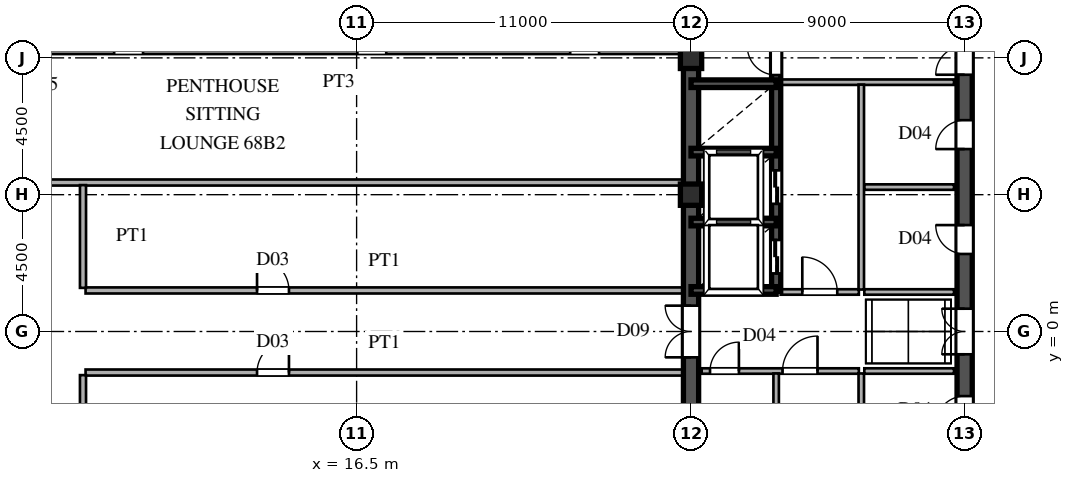
"""IFC4 building model, lengths in metres.
Left out: names, types, materials, properties, quantities, classifications, styles, units other than length and angle.
Written with IfcOpenShell. Run it as: python <this file> out.ifc"""

import sys

from ifc_helpers import new_model, si_unit, direction, frame, frame_2d, origin, origin_2d, place, context, subcontext, project, spatial, rectangle, hollow_rectangle, extrude, source, transform, mapped, element, fill, save


model = new_model("IFC4")
c1 = context("Model", 3, precision=1e-05, world=origin(), true_north=direction((0.0, 1.0)))
c2 = subcontext(c1, "Body", "Model", "MODEL_VIEW")
j1 = project(units=[si_unit("LENGTHUNIT", "METRE"), si_unit("PLANEANGLEUNIT", "RADIAN")], contexts=[c1])
p1 = place(None, origin())
s1 = spatial("IfcSite", under=j1, at=p1, CompositionType="ELEMENT")
p2 = place(p1, origin())
s2 = spatial("IfcBuilding", under=s1, at=p2, CompositionType="ELEMENT")
p3 = place(p2, frame((0.0, 0.0, 258.15)))
s3 = spatial("IfcBuildingStorey", under=s2, at=p3, CompositionType="ELEMENT", Elevation=258.15)
m1 = source(origin(), c2, "Body", "SweptSolid", [
    extrude(hollow_rectangle(XDim=0.7, YDim=0.7, WallThickness=0.03, at=origin_2d()), origin(), (0.0, 0.0, 1.0), 3.75),
])
for number, where, z_axis, x_axis in (
    (1, (27.5, 4.5, 0.0), (0.0, 0.0, 1.0), (1.0, 0.0, 0.0)),
    (2, (27.5, 9.0, 0.0), (0.0, 0.0, 1.0), (1.0, 0.0, 0.0)),
):
    element("IfcColumn", number, at=place(p3, frame(where, z_axis=z_axis, x_axis=x_axis)), inside=s3, PredefinedType="COLUMN", context=c2, shape_type="MappedRepresentation", body=[
        mapped(m1, transform((0.0, 0.0, 0.0), scale=1.0)),
    ])
for number, where, z_axis, x_axis in (
    (3, (27.5, -13.5, 0.0), (0.0, 0.0, 1.0), (0.0, 1.0, 0.0)),
    (4, (27.5, 1.3, 0.0), (0.0, 0.0, 1.0), (0.0, 1.0, 0.0)),
):
    element("IfcWall", number, at=place(p3, frame(where, z_axis=z_axis, x_axis=x_axis)), inside=s3, PredefinedType="SHEAR", context=c2, shape_type="SweptSolid", body=[
        extrude(rectangle(XDim=12.2, YDim=0.5, at=frame_2d((6.1, 0.0))), origin(), (0.0, 0.0, 1.0), 3.53),
    ])
p4 = place(p3, frame((27.5, -1.3, 0.0), z_axis=(0.0, 0.0, 1.0), x_axis=(0.0, 1.0, 0.0)))
e5 = element("IfcWall", 5, at=p4, inside=s3, PredefinedType="SHEAR", context=c2, shape_type="SweptSolid", body=[
    extrude(rectangle(XDim=2.6, YDim=0.5, at=frame_2d((1.3, 0.0))), origin(), (0.0, 0.0, 1.0), 3.53),
])
p5 = place(p4, frame((0.45, 0.0, 0.0)))
e6 = element("IfcOpeningElement", 6, at=p5, cuts=e5, PredefinedType="OPENING", context=c2, shape_type="SweptSolid", body=[
    extrude(rectangle(XDim=1.7, YDim=2.35, at=frame_2d((0.85, 1.175))), frame((0.0, 0.26, 0.0), z_axis=(0.0, -1.0, 0.0), x_axis=(1.0, 0.0, 0.0)), (0.0, 0.0, 1.0), 0.52),
])
p6 = place(p3, frame((36.5, -1.3, 0.0), z_axis=(0.0, 0.0, 1.0), x_axis=(0.0, 1.0, 0.0)))
e7 = element("IfcWall", 7, at=p6, inside=s3, PredefinedType="SHEAR", context=c2, shape_type="SweptSolid", body=[
    extrude(rectangle(XDim=2.6, YDim=0.5, at=frame_2d((1.3, 0.0))), origin(), (0.0, 0.0, 1.0), 3.53),
])
p7 = place(p6, frame((0.55, 0.0, 0.0)))
e8 = element("IfcOpeningElement", 8, at=p7, cuts=e7, PredefinedType="OPENING", context=c2, shape_type="SweptSolid", body=[
    extrude(rectangle(XDim=1.5, YDim=2.3, at=frame_2d((0.75, 1.15))), frame((0.0, 0.26, 0.0), z_axis=(0.0, -1.0, 0.0), x_axis=(1.0, 0.0, 0.0)), (0.0, 0.0, 1.0), 0.52),
])
p8 = place(p3, frame((36.5, 8.2, 0.0), z_axis=(0.0, 0.0, 1.0), x_axis=(0.0, 1.0, 0.0)))
e9 = element("IfcWall", 9, at=p8, inside=s3, PredefinedType="SHEAR", context=c2, shape_type="SweptSolid", body=[
    extrude(rectangle(XDim=5.45, YDim=0.5, at=frame_2d((2.725, 0.0))), origin(), (0.0, 0.0, 1.0), 3.53),
])
p9 = place(p8, frame((0.245, 0.0, 0.0)))
e10 = element("IfcOpeningElement", 10, at=p9, cuts=e9, PredefinedType="OPENING", context=c2, shape_type="SweptSolid", body=[
    extrude(rectangle(XDim=0.95, YDim=2.15, at=frame_2d((0.475, 1.075))), frame((0.0, 0.26, 0.0), z_axis=(0.0, -1.0, 0.0), x_axis=(1.0, 0.0, 0.0)), (0.0, 0.0, 1.0), 0.52),
])
p10 = place(p3, frame((36.5, -3.9, 0.0), z_axis=(0.0, 0.0, 1.0), x_axis=(0.0, 1.0, 0.0)))
e11 = element("IfcWall", 11, at=p10, inside=s3, PredefinedType="SHEAR", context=c2, shape_type="SweptSolid", body=[
    extrude(rectangle(XDim=2.6, YDim=0.5, at=frame_2d((1.3, 0.0))), origin(), (0.0, 0.0, 1.0), 3.53),
])
p11 = place(p10, frame((0.825, 0.0, 0.0)))
e12 = element("IfcOpeningElement", 12, at=p11, cuts=e11, PredefinedType="OPENING", context=c2, shape_type="SweptSolid", body=[
    extrude(rectangle(XDim=0.95, YDim=2.15, at=frame_2d((0.475, 1.075))), frame((0.0, 0.26, 0.0), z_axis=(0.0, -1.0, 0.0), x_axis=(1.0, 0.0, 0.0)), (0.0, 0.0, 1.0), 0.52),
])
p12 = place(p3, frame((36.5, 1.3, 0.0), z_axis=(0.0, 0.0, 1.0), x_axis=(0.0, 1.0, 0.0)))
e13 = element("IfcWall", 13, at=p12, inside=s3, PredefinedType="SHEAR", context=c2, shape_type="SweptSolid", body=[
    extrude(rectangle(XDim=3.45, YDim=0.5, at=frame_2d((1.725, 0.0))), origin(), (0.0, 0.0, 1.0), 3.53),
])
p13 = place(p12, frame((1.25, 0.0, 0.0)))
e14 = element("IfcOpeningElement", 14, at=p13, cuts=e13, PredefinedType="OPENING", context=c2, shape_type="SweptSolid", body=[
    extrude(rectangle(XDim=0.95, YDim=2.15, at=frame_2d((0.475, 1.075))), frame((0.0, 0.26, 0.0), z_axis=(0.0, -1.0, 0.0), x_axis=(1.0, 0.0, 0.0)), (0.0, 0.0, 1.0), 0.52),
])
p14 = place(p3, frame((36.5, 4.75, 0.0), z_axis=(0.0, 0.0, 1.0), x_axis=(0.0, 1.0, 0.0)))
e15 = element("IfcWall", 15, at=p14, inside=s3, PredefinedType="SHEAR", context=c2, shape_type="SweptSolid", body=[
    extrude(rectangle(XDim=3.45, YDim=0.5, at=frame_2d((1.725, 0.0))), origin(), (0.0, 0.0, 1.0), 3.53),
])
p15 = place(p14, frame((1.25, 0.0, 0.0)))
e16 = element("IfcOpeningElement", 16, at=p15, cuts=e15, PredefinedType="OPENING", context=c2, shape_type="SweptSolid", body=[
    extrude(rectangle(XDim=0.95, YDim=2.15, at=frame_2d((0.475, 1.075))), frame((0.0, 0.26, 0.0), z_axis=(0.0, -1.0, 0.0), x_axis=(1.0, 0.0, 0.0)), (0.0, 0.0, 1.0), 0.52),
])
for number, where, z_axis, x_axis in (
    (17, (27.5, 1.35, 0.0), (0.0, 0.0, 1.0), (1.0, 0.0, 0.0)),
    (18, (27.5, 3.6, 0.0), (0.0, 0.0, 1.0), (1.0, 0.0, 0.0)),
    (19, (27.5, 5.9, 0.0), (0.0, 0.0, 1.0), (1.0, 0.0, 0.0)),
    (20, (27.5, 8.15, 0.0), (0.0, 0.0, 1.0), (1.0, 0.0, 0.0)),
):
    element("IfcWall", number, at=place(p3, frame(where, z_axis=z_axis, x_axis=x_axis)), inside=s3, PredefinedType="SHEAR", context=c2, shape_type="SweptSolid", body=[
        extrude(rectangle(XDim=2.8, YDim=0.25, at=frame_2d((1.4, 0.0))), origin(), (0.0, 0.0, 1.0), 3.53),
    ])
p16 = place(p3, frame((30.3, 1.32, 0.0), z_axis=(0.0, 0.0, 1.0), x_axis=(0.0, 1.0, 0.0)))
e21 = element("IfcWall", 21, at=p16, inside=s3, PredefinedType="SHEAR", context=c2, shape_type="SweptSolid", body=[
    extrude(rectangle(XDim=2.28, YDim=0.3, at=frame_2d((1.14, 0.0))), origin(), (0.0, 0.0, 1.0), 3.53),
])
p17 = place(p16, frame((0.59, 0.0, 0.0)))
e22 = element("IfcOpeningElement", 22, at=p17, cuts=e21, PredefinedType="OPENING", context=c2, shape_type="SweptSolid", body=[
    extrude(rectangle(XDim=1.1, YDim=2.2, at=frame_2d((0.55, 1.1))), frame((0.0, 0.16, 0.0), z_axis=(0.0, -1.0, 0.0), x_axis=(1.0, 0.0, 0.0)), (0.0, 0.0, 1.0), 0.32),
])
p18 = place(p3, frame((30.3, 3.6, 0.0), z_axis=(0.0, 0.0, 1.0), x_axis=(0.0, 1.0, 0.0)))
e23 = element("IfcWall", 23, at=p18, inside=s3, PredefinedType="SHEAR", context=c2, shape_type="SweptSolid", body=[
    extrude(rectangle(XDim=2.3, YDim=0.3, at=frame_2d((1.15, 0.0))), origin(), (0.0, 0.0, 1.0), 3.53),
])
p19 = place(p18, frame((0.6, 0.0, 0.0)))
e24 = element("IfcOpeningElement", 24, at=p19, cuts=e23, PredefinedType="OPENING", context=c2, shape_type="SweptSolid", body=[
    extrude(rectangle(XDim=1.1, YDim=2.2, at=frame_2d((0.55, 1.1))), frame((0.0, 0.16, 0.0), z_axis=(0.0, -1.0, 0.0), x_axis=(1.0, 0.0, 0.0)), (0.0, 0.0, 1.0), 0.32),
])
p20 = place(p3, frame((30.3, 5.9, 0.0), z_axis=(0.0, 0.0, 1.0), x_axis=(0.0, 1.0, 0.0)))
e25 = element("IfcWall", 25, at=p20, inside=s3, PredefinedType="SHEAR", context=c2, shape_type="SweptSolid", body=[
    extrude(rectangle(XDim=2.25, YDim=0.3, at=frame_2d((1.125, 0.0))), origin(), (0.0, 0.0, 1.0), 3.53),
])
p21 = place(p3, frame((30.3, 8.15, 0.0), z_axis=(0.0, 0.0, 1.0), x_axis=(0.0, 1.0, 0.0)))
e26 = element("IfcWall", 26, at=p21, inside=s3, PredefinedType="SHEAR", context=c2, shape_type="SweptSolid", body=[
    extrude(rectangle(XDim=1.53, YDim=0.3, at=frame_2d((0.765, 0.0))), origin(), (0.0, 0.0, 1.0), 3.53),
])
p22 = place(p21, frame((0.285, 0.0, 0.0)))
e27 = element("IfcOpeningElement", 27, at=p22, cuts=e26, PredefinedType="OPENING", context=c2, shape_type="SweptSolid", body=[
    extrude(rectangle(XDim=0.95, YDim=2.15, at=frame_2d((0.475, 1.075))), frame((0.0, 0.16, 0.0), z_axis=(0.0, -1.0, 0.0), x_axis=(1.0, 0.0, 0.0)), (0.0, 0.0, 1.0), 0.32),
])
p23 = place(p3, frame((30.45, 8.2, 0.0), z_axis=(0.0, 0.0, 1.0), x_axis=(1.0, 0.0, 0.0)))
e28 = element("IfcWall", 28, at=p23, inside=s3, PredefinedType="PARTITIONING", context=c2, shape_type="SweptSolid", body=[
    extrude(rectangle(XDim=5.7, YDim=0.18, at=frame_2d((2.85, 0.0))), origin(), (0.0, 0.0, 1.0), 3.53),
])
p24 = place(p3, frame((33.1, -6.42, 0.0), z_axis=(0.0, 0.0, 1.0), x_axis=(0.0, 1.0, 0.0)))
e29 = element("IfcWall", 29, at=p24, inside=s3, PredefinedType="PARTITIONING", context=c2, shape_type="SweptSolid", body=[
    extrude(rectangle(XDim=5.04, YDim=0.18, at=frame_2d((2.52, 0.0))), origin(), (0.0, 0.0, 1.0), 3.53),
])
p25 = place(p3, frame((33.1, 1.38, 0.0), z_axis=(0.0, 0.0, 1.0), x_axis=(0.0, 1.0, 0.0)))
e30 = element("IfcWall", 30, at=p25, inside=s3, PredefinedType="PARTITIONING", context=c2, shape_type="SweptSolid", body=[
    extrude(rectangle(XDim=6.74, YDim=0.18, at=frame_2d((3.37, 0.0))), origin(), (0.0, 0.0, 1.0), 3.53),
])
p26 = place(p3, frame((27.85, -1.3, 0.0), z_axis=(0.0, 0.0, 1.0), x_axis=(1.0, 0.0, 0.0)))
e31 = element("IfcWall", 31, at=p26, inside=s3, PredefinedType="PARTITIONING", context=c2, shape_type="SweptSolid", body=[
    extrude(rectangle(XDim=2.45, YDim=0.18, at=frame_2d((1.225, 0.0))), origin(), (0.0, 0.0, 1.0), 3.53),
])
p27 = place(p26, frame((0.275, 0.0, 0.0)))
e32 = element("IfcOpeningElement", 32, at=p27, cuts=e31, PredefinedType="OPENING", context=c2, shape_type="SweptSolid", body=[
    extrude(rectangle(XDim=0.95, YDim=2.15, at=frame_2d((0.475, 1.075))), frame((0.0, 0.1, 0.0), z_axis=(0.0, -1.0, 0.0), x_axis=(1.0, 0.0, 0.0)), (0.0, 0.0, 1.0), 0.2),
])
p28 = place(p3, frame((30.3, -1.3, 0.0), z_axis=(0.0, 0.0, 1.0), x_axis=(1.0, 0.0, 0.0)))
e33 = element("IfcWall", 33, at=p28, inside=s3, PredefinedType="PARTITIONING", context=c2, shape_type="SweptSolid", body=[
    extrude(rectangle(XDim=2.72, YDim=0.18, at=frame_2d((1.36, 0.0))), origin(), (0.0, 0.0, 1.0), 3.53),
])
p29 = place(p28, frame((0.21, 0.0, 0.0)))
e34 = element("IfcOpeningElement", 34, at=p29, cuts=e33, PredefinedType="OPENING", context=c2, shape_type="SweptSolid", body=[
    extrude(rectangle(XDim=1.15, YDim=2.2, at=frame_2d((0.575, 1.1))), frame((0.0, 0.1, 0.0), z_axis=(0.0, -1.0, 0.0), x_axis=(1.0, 0.0, 0.0)), (0.0, 0.0, 1.0), 0.2),
])
p30 = place(p3, frame((30.3, -7.12, 0.0), z_axis=(0.0, 0.0, 1.0), x_axis=(0.0, 1.0, 0.0)))
e35 = element("IfcWall", 35, at=p30, inside=s3, PredefinedType="PARTITIONING", context=c2, shape_type="SweptSolid", body=[
    extrude(rectangle(XDim=5.74, YDim=0.18, at=frame_2d((2.87, 0.0))), origin(), (0.0, 0.0, 1.0), 3.53),
])
p31 = place(p3, frame((30.45, 1.3, 0.0), z_axis=(0.0, 0.0, 1.0), x_axis=(1.0, 0.0, 0.0)))
e36 = element("IfcWall", 36, at=p31, inside=s3, PredefinedType="PARTITIONING", context=c2, shape_type="SweptSolid", body=[
    extrude(rectangle(XDim=2.57, YDim=0.18, at=frame_2d((1.285, 0.0))), origin(), (0.0, 0.0, 1.0), 3.53),
])
p32 = place(p31, frame((0.71, 0.0, 0.0)))
e37 = element("IfcOpeningElement", 37, at=p32, cuts=e36, PredefinedType="OPENING", context=c2, shape_type="SweptSolid", body=[
    extrude(rectangle(XDim=1.15, YDim=2.2, at=frame_2d((0.575, 1.1))), frame((0.0, 0.1, 0.0), z_axis=(0.0, -1.0, 0.0), x_axis=(1.0, 0.0, 0.0)), (0.0, 0.0, 1.0), 0.2),
])
for number, where, z_axis, x_axis in (
    (38, (33.2, -1.3, 0.0), (0.0, 0.0, 1.0), (1.0, 0.0, 0.0)),
    (39, (33.2, 1.3, 0.0), (0.0, 0.0, 1.0), (1.0, 0.0, 0.0)),
    (40, (33.2, 4.75, 0.0), (0.0, 0.0, 1.0), (1.0, 0.0, 0.0)),
):
    element("IfcWall", number, at=place(p3, frame(where, z_axis=z_axis, x_axis=x_axis)), inside=s3, PredefinedType="PARTITIONING", context=c2, shape_type="SweptSolid", body=[
        extrude(rectangle(XDim=2.95, YDim=0.18, at=frame_2d((1.475, 0.0))), origin(), (0.0, 0.0, 1.0), 3.53),
    ])
p33 = place(p3, frame((7.585, -1.35, 0.0), z_axis=(0.0, 0.0, 1.0), x_axis=(1.0, 0.0, 0.0)))
e41 = element("IfcWall", 41, at=p33, inside=s3, PredefinedType="PARTITIONING", context=c2, shape_type="SweptSolid", body=[
    extrude(rectangle(XDim=19.66, YDim=0.2, at=frame_2d((9.83, 0.0))), origin(), (0.0, 0.0, 1.0), 3.53),
])
p34 = place(p33, frame((5.64, 0.0, 0.0)))
e42 = element("IfcOpeningElement", 42, at=p34, cuts=e41, PredefinedType="OPENING", context=c2, shape_type="SweptSolid", body=[
    extrude(rectangle(XDim=1.05, YDim=2.25, at=frame_2d((0.525, 1.125))), frame((0.0, 0.11, 0.0), z_axis=(0.0, -1.0, 0.0), x_axis=(1.0, 0.0, 0.0)), (0.0, 0.0, 1.0), 0.22),
])
p35 = place(p3, frame((7.585, 1.35, 0.0), z_axis=(0.0, 0.0, 1.0), x_axis=(1.0, 0.0, 0.0)))
e43 = element("IfcWall", 43, at=p35, inside=s3, PredefinedType="PARTITIONING", context=c2, shape_type="SweptSolid", body=[
    extrude(rectangle(XDim=19.66, YDim=0.2, at=frame_2d((9.83, 0.0))), origin(), (0.0, 0.0, 1.0), 3.53),
])
p36 = place(p35, frame((5.64, 0.0, 0.0)))
e44 = element("IfcOpeningElement", 44, at=p36, cuts=e43, PredefinedType="OPENING", context=c2, shape_type="SweptSolid", body=[
    extrude(rectangle(XDim=1.05, YDim=2.25, at=frame_2d((0.525, 1.125))), frame((0.0, 0.11, 0.0), z_axis=(0.0, -1.0, 0.0), x_axis=(1.0, 0.0, 0.0)), (0.0, 0.0, 1.0), 0.22),
])
p37 = place(p3, frame((-27.245, 4.9, 0.0), z_axis=(0.0, 0.0, 1.0), x_axis=(1.0, 0.0, 0.0)))
e45 = element("IfcWall", 45, at=p37, inside=s3, PredefinedType="PARTITIONING", context=c2, shape_type="SweptSolid", body=[
    extrude(rectangle(XDim=54.49, YDim=0.2, at=frame_2d((27.245, 0.0))), origin(), (0.0, 0.0, 1.0), 3.53),
])
p38 = place(p37, frame((22.47, 0.0, 0.0)))
e46 = element("IfcOpeningElement", 46, at=p38, cuts=e45, PredefinedType="OPENING", context=c2, shape_type="SweptSolid", body=[
    extrude(rectangle(XDim=1.05, YDim=2.25, at=frame_2d((0.525, 1.125))), frame((0.0, 0.11, 0.0), z_axis=(0.0, -1.0, 0.0), x_axis=(1.0, 0.0, 0.0)), (0.0, 0.0, 1.0), 0.22),
])
p39 = place(p3, frame((4.585, 9.2, 0.0), z_axis=(0.0, 0.0, 1.0), x_axis=(1.0, 0.0, 0.0)))
e47 = element("IfcWall", 47, at=p39, inside=s3, PredefinedType="PARTITIONING", context=c2, shape_type="SweptSolid", body=[
    extrude(rectangle(XDim=22.66, YDim=0.15, at=frame_2d((11.33, 0.0))), origin(), (0.0, 0.0, 1.0), 3.53),
])
p40 = place(p39, frame((3.94, 0.0, 0.0)))
e48 = element("IfcOpeningElement", 48, at=p40, cuts=e47, PredefinedType="OPENING", context=c2, shape_type="SweptSolid", body=[
    extrude(rectangle(XDim=0.95, YDim=2.15, at=frame_2d((0.475, 1.075))), frame((0.0, 0.085, 0.0), z_axis=(0.0, -1.0, 0.0), x_axis=(1.0, 0.0, 0.0)), (0.0, 0.0, 1.0), 0.17),
])
p41 = place(p39, frame((11.94, 0.0, 0.0)))
e49 = element("IfcOpeningElement", 49, at=p41, cuts=e47, PredefinedType="OPENING", context=c2, shape_type="SweptSolid", body=[
    extrude(rectangle(XDim=0.95, YDim=2.15, at=frame_2d((0.475, 1.075))), frame((0.0, 0.085, 0.0), z_axis=(0.0, -1.0, 0.0), x_axis=(1.0, 0.0, 0.0)), (0.0, 0.0, 1.0), 0.17),
])
p42 = place(p39, frame((18.94, 0.0, 0.0)))
e50 = element("IfcOpeningElement", 50, at=p42, cuts=e47, PredefinedType="OPENING", context=c2, shape_type="SweptSolid", body=[
    extrude(rectangle(XDim=0.95, YDim=2.15, at=frame_2d((0.475, 1.075))), frame((0.0, 0.085, 0.0), z_axis=(0.0, -1.0, 0.0), x_axis=(1.0, 0.0, 0.0)), (0.0, 0.0, 1.0), 0.17),
])
for number, where, z_axis, x_axis in (
    (51, (7.5, -4.815, 0.0), (0.0, 0.0, 1.0), (0.0, 1.0, 0.0)),
    (52, (7.5, 1.435, 0.0), (0.0, 0.0, 1.0), (0.0, 1.0, 0.0)),
):
    element("IfcWall", number, at=place(p3, frame(where, z_axis=z_axis, x_axis=x_axis)), inside=s3, PredefinedType="PARTITIONING", context=c2, shape_type="SweptSolid", body=[
        extrude(rectangle(XDim=3.38, YDim=0.2, at=frame_2d((1.69, 0.0))), origin(), (0.0, 0.0, 1.0), 3.53),
    ])
m2 = source(origin(), c2, "Body", "SweptSolid", [
    extrude(rectangle(XDim=1.7, YDim=2.35, at=frame_2d((0.85, 1.175))), frame((0.0, 0.025, 0.0), z_axis=(0.0, -1.0, 0.0), x_axis=(1.0, 0.0, 0.0)), (0.0, 0.0, 1.0), 0.05),
])
p43 = place(p5, origin())
e53 = element("IfcDoor", 53, at=p43, inside=s3, OperationType="DOUBLE_SWING_LEFT", PredefinedType="DOOR", context=c2, shape_type="MappedRepresentation", body=[
    mapped(m2, transform((0.0, 0.0, 0.0), scale=1.0)),
])
fill(e6, e53)
m3 = source(origin(), c2, "Body", "SweptSolid", [
    extrude(rectangle(XDim=1.5, YDim=2.3, at=frame_2d((0.75, 1.15))), frame((0.0, 0.025, 0.0), z_axis=(0.0, -1.0, 0.0), x_axis=(1.0, 0.0, 0.0)), (0.0, 0.0, 1.0), 0.05),
])
p44 = place(p7, origin())
e54 = element("IfcDoor", 54, at=p44, inside=s3, OperationType="DOUBLE_SWING_LEFT", PredefinedType="DOOR", context=c2, shape_type="MappedRepresentation", body=[
    mapped(m3, transform((0.0, 0.0, 0.0), scale=1.0)),
])
fill(e8, e54)
m4 = source(origin(), c2, "Body", "SweptSolid", [
    extrude(rectangle(XDim=0.95, YDim=2.15, at=frame_2d((0.475, 1.075))), frame((0.0, 0.025, 0.0), z_axis=(0.0, -1.0, 0.0), x_axis=(1.0, 0.0, 0.0)), (0.0, 0.0, 1.0), 0.05),
])
p45 = place(p9, origin())
e55 = element("IfcDoor", 55, at=p45, inside=s3, OperationType="SINGLE_SWING_LEFT", PredefinedType="DOOR", context=c2, shape_type="MappedRepresentation", body=[
    mapped(m4, transform((0.0, 0.0, 0.0), scale=1.0)),
])
fill(e10, e55)
p46 = place(p11, origin())
e56 = element("IfcDoor", 56, at=p46, inside=s3, OperationType="SINGLE_SWING_LEFT", PredefinedType="DOOR", context=c2, shape_type="MappedRepresentation", body=[
    mapped(m4, transform((0.0, 0.0, 0.0), scale=1.0)),
])
fill(e12, e56)
p47 = place(p13, origin())
e57 = element("IfcDoor", 57, at=p47, inside=s3, OperationType="SINGLE_SWING_RIGHT", PredefinedType="DOOR", context=c2, shape_type="MappedRepresentation", body=[
    mapped(m4, transform((0.0, 0.0, 0.0), scale=1.0)),
])
fill(e14, e57)
p48 = place(p15, origin())
e58 = element("IfcDoor", 58, at=p48, inside=s3, OperationType="SINGLE_SWING_LEFT", PredefinedType="DOOR", context=c2, shape_type="MappedRepresentation", body=[
    mapped(m4, transform((0.0, 0.0, 0.0), scale=1.0)),
])
fill(e16, e58)
m5 = source(origin(), c2, "Body", "SweptSolid", [
    extrude(rectangle(XDim=1.1, YDim=2.2, at=frame_2d((0.55, 1.1))), frame((0.0, 0.025, 0.0), z_axis=(0.0, -1.0, 0.0), x_axis=(1.0, 0.0, 0.0)), (0.0, 0.0, 1.0), 0.05),
])
p49 = place(p17, origin())
e59 = element("IfcDoor", 59, at=p49, inside=s3, OperationType="DOUBLE_DOOR_SLIDING", PredefinedType="DOOR", context=c2, shape_type="MappedRepresentation", body=[
    mapped(m5, transform((0.0, 0.0, 0.0), scale=1.0)),
])
fill(e22, e59)
p50 = place(p19, origin())
e60 = element("IfcDoor", 60, at=p50, inside=s3, OperationType="DOUBLE_DOOR_SLIDING", PredefinedType="DOOR", context=c2, shape_type="MappedRepresentation", body=[
    mapped(m5, transform((0.0, 0.0, 0.0), scale=1.0)),
])
fill(e24, e60)
p51 = place(p22, origin())
e61 = element("IfcDoor", 61, at=p51, inside=s3, OperationType="SINGLE_SWING_RIGHT", PredefinedType="DOOR", context=c2, shape_type="MappedRepresentation", body=[
    mapped(m4, transform((0.0, 0.0, 0.0), scale=1.0)),
])
fill(e27, e61)
p52 = place(p27, origin())
e62 = element("IfcDoor", 62, at=p52, inside=s3, OperationType="SINGLE_SWING_RIGHT", PredefinedType="DOOR", context=c2, shape_type="MappedRepresentation", body=[
    mapped(m4, transform((0.0, 0.0, 0.0), scale=1.0)),
])
fill(e32, e62)
m6 = source(origin(), c2, "Body", "SweptSolid", [
    extrude(rectangle(XDim=1.15, YDim=2.2, at=frame_2d((0.575, 1.1))), frame((0.0, 0.025, 0.0), z_axis=(0.0, -1.0, 0.0), x_axis=(1.0, 0.0, 0.0)), (0.0, 0.0, 1.0), 0.05),
])
p53 = place(p29, origin())
e63 = element("IfcDoor", 63, at=p53, inside=s3, OperationType="SINGLE_SWING_RIGHT", PredefinedType="DOOR", context=c2, shape_type="MappedRepresentation", body=[
    mapped(m6, transform((0.0, 0.0, 0.0), scale=1.0)),
])
fill(e34, e63)
p54 = place(p32, origin())
e64 = element("IfcDoor", 64, at=p54, inside=s3, OperationType="SINGLE_SWING_LEFT", PredefinedType="DOOR", context=c2, shape_type="MappedRepresentation", body=[
    mapped(m6, transform((0.0, 0.0, 0.0), scale=1.0)),
])
fill(e37, e64)
m7 = source(origin(), c2, "Body", "SweptSolid", [
    extrude(rectangle(XDim=1.05, YDim=2.25, at=frame_2d((0.525, 1.125))), frame((0.0, 0.025, 0.0), z_axis=(0.0, -1.0, 0.0), x_axis=(1.0, 0.0, 0.0)), (0.0, 0.0, 1.0), 0.05),
])
p55 = place(p34, origin())
e65 = element("IfcDoor", 65, at=p55, inside=s3, OperationType="SINGLE_SWING_RIGHT", PredefinedType="DOOR", context=c2, shape_type="MappedRepresentation", body=[
    mapped(m7, transform((0.0, 0.0, 0.0), scale=1.0)),
])
fill(e42, e65)
p56 = place(p36, origin())
e66 = element("IfcDoor", 66, at=p56, inside=s3, OperationType="SINGLE_SWING_LEFT", PredefinedType="DOOR", context=c2, shape_type="MappedRepresentation", body=[
    mapped(m7, transform((0.0, 0.0, 0.0), scale=1.0)),
])
fill(e44, e66)
m8 = source(origin(), c2, "Body", "SweptSolid", [
    extrude(rectangle(XDim=0.95, YDim=2.15, at=frame_2d((0.475, 1.075))), frame((0.0, 0.025, 0.0), z_axis=(0.0, -1.0, 0.0), x_axis=(1.0, 0.0, 0.0)), (0.0, 0.0, 1.0), 0.05),
])
p57 = place(p40, origin())
e67 = element("IfcDoor", 67, at=p57, inside=s3, OperationType="SINGLE_SWING_LEFT", PredefinedType="DOOR", context=c2, shape_type="MappedRepresentation", body=[
    mapped(m8, transform((0.0, 0.0, 0.0), scale=1.0)),
])
fill(e48, e67)
p58 = place(p41, origin())
e68 = element("IfcDoor", 68, at=p58, inside=s3, OperationType="SINGLE_SWING_RIGHT", PredefinedType="DOOR", context=c2, shape_type="MappedRepresentation", body=[
    mapped(m8, transform((0.0, 0.0, 0.0), scale=1.0)),
])
fill(e49, e68)
p59 = place(p42, origin())
e69 = element("IfcDoor", 69, at=p59, inside=s3, OperationType="SINGLE_SWING_LEFT", PredefinedType="DOOR", context=c2, shape_type="MappedRepresentation", body=[
    mapped(m8, transform((0.0, 0.0, 0.0), scale=1.0)),
])
fill(e50, e69)
save(model, sys.argv[1])
